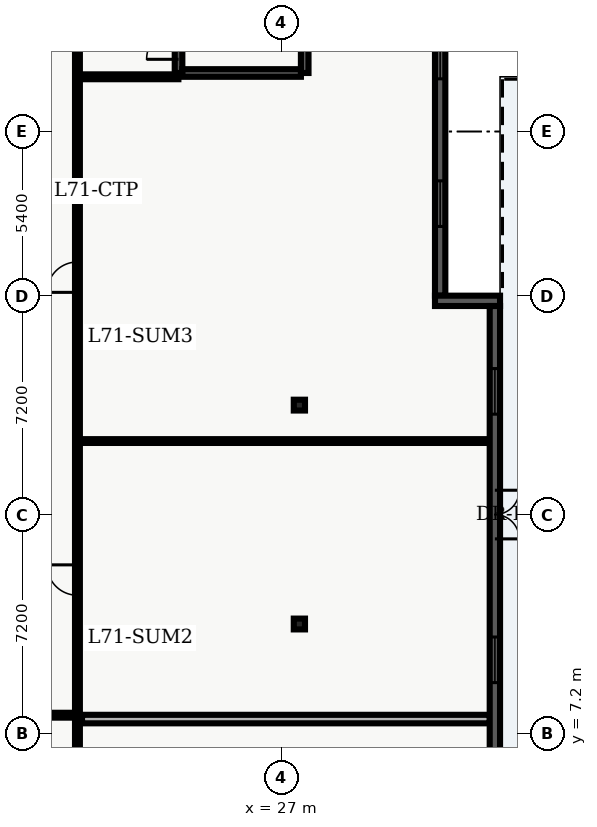
"""IFC4 building model, lengths in metres.
Left out: names, types, materials, properties, quantities, classifications, styles, units other than length and angle.
Written with IfcOpenShell. Run it as: python <this file> out.ifc"""

import sys

from ifc_helpers import new_model, entity, si_unit, converted_unit, direction, frame, origin_with_axes, origin_2d_with_axis, place, context, subcontext, project, spatial, polyline, rectangle, i_section, outline, extrude, element, fill, save


model = new_model("IFC4")
c1 = context("Model", 3, precision=1e-05, world=origin_with_axes(), true_north=direction((0.0, 1.0)))
c2 = subcontext(c1, "Body", "Model", "MODEL_VIEW")
j1 = project(units=[si_unit("LENGTHUNIT", "METRE"), converted_unit("PLANEANGLEUNIT", "DEGREE", entity("IfcPlaneAngleMeasure", 0.017), si_unit("PLANEANGLEUNIT", "RADIAN"), dimensions=[0, 0, 0, 0, 0, 0, 0])], contexts=[c1])
p1 = place(None, origin_with_axes())
s1 = spatial("IfcSite", under=j1, at=p1, CompositionType="ELEMENT")
p2 = place(p1, origin_with_axes())
s2 = spatial("IfcBuilding", under=s1, at=p2, CompositionType="ELEMENT")
p3 = place(p2, frame((0.0, 0.0, 288.0), z_axis=(0.0, 0.0, 1.0), x_axis=(1.0, 0.0, 0.0)))
s3 = spatial("IfcBuildingStorey", under=s2, at=p3, CompositionType="ELEMENT", Elevation=288.0)
p4 = place(p3, frame((23.625, 28.925, 0.0), z_axis=(0.0, 0.0, 1.0), x_axis=(0.0, 1.0, 0.0)))
e1 = element("IfcWall", 1, at=p4, inside=s3, PredefinedType="SHEAR", context=c2, shape_type="SweptSolid", body=[
    extrude(outline(polyline([(0.0, -0.125), (8.65, -0.125), (8.65, 0.125), (0.0, 0.125), (0.0, -0.125)])), origin_with_axes(), (0.0, 0.0, 1.0), 3.66),
])
p5 = place(p4, frame((0.975, 0.0, 0.0), z_axis=(0.0, 0.0, 1.0), x_axis=(1.0, 0.0, 0.0)))
e2 = element("IfcOpeningElement", 2, at=p5, cuts=e1, PredefinedType="OPENING", context=c2, shape_type="SweptSolid", body=[
    extrude(rectangle(XDim=1.05, YDim=0.27, at=origin_2d_with_axis()), origin_with_axes(), (0.0, 0.0, 1.0), 2.15),
])
p6 = place(p3, frame((27.775, 28.925, 0.0), z_axis=(0.0, 0.0, 1.0), x_axis=(0.0, 1.0, 0.0)))
e3 = element("IfcWall", 3, at=p6, inside=s3, PredefinedType="SHEAR", context=c2, shape_type="SweptSolid", body=[
    extrude(outline(polyline([(0.0, -0.125), (8.65, -0.125), (8.65, 0.125), (0.0, 0.125), (0.0, -0.125)])), origin_with_axes(), (0.0, 0.0, 1.0), 3.66),
])
p7 = place(p3, frame((23.75, 28.925, 0.0), z_axis=(0.0, 0.0, 1.0), x_axis=(1.0, 0.0, 0.0)))
e4 = element("IfcWall", 4, at=p7, inside=s3, PredefinedType="SHEAR", context=c2, shape_type="SweptSolid", body=[
    extrude(outline(polyline([(0.0, -0.125), (3.9, -0.125), (3.9, 0.125), (0.0, 0.125), (0.0, -0.125)])), origin_with_axes(), (0.0, 0.0, 1.0), 3.66),
])
for number, where, z_axis, x_axis in (
    (5, (27.6, 10.8, 0.0), (0.0, 0.0, 1.0), (1.0, 0.0, 0.0)),
    (6, (27.6, 18.0, 0.0), (0.0, 0.0, 1.0), (1.0, 0.0, 0.0)),
):
    element("IfcColumn", number, at=place(p3, frame(where, z_axis=z_axis, x_axis=x_axis)), inside=s3, PredefinedType="COLUMN", context=c2, shape_type="SweptSolid", body=[
        extrude(i_section(OverallWidth=0.369, OverallDepth=0.356, WebThickness=0.011, FlangeThickness=0.018, FilletRadius=0.018, at=origin_2d_with_axis()), origin_with_axes(), (0.0, 0.0, 1.0), 3.9),
    ])
p8 = place(p3, frame((8.135, 7.8, 0.0), z_axis=(0.0, 0.0, 1.0), x_axis=(1.0, 0.0, 0.0)))
e7 = element("IfcWall", 7, at=p8, inside=s3, PredefinedType="PARTITIONING", context=c2, shape_type="SweptSolid", body=[
    extrude(outline(polyline([(0.0, -0.08), (12.165, -0.08), (12.165, 0.08), (0.0, 0.08), (0.0, -0.08)])), origin_with_axes(), (0.0, 0.0, 1.0), 2.7),
])
p9 = place(p8, frame((3.982, 0.0, 0.0), z_axis=(0.0, 0.0, 1.0), x_axis=(1.0, 0.0, 0.0)))
e8 = element("IfcOpeningElement", 8, at=p9, cuts=e7, PredefinedType="OPENING", context=c2, shape_type="SweptSolid", body=[
    extrude(rectangle(XDim=1.0, YDim=0.18, at=origin_2d_with_axis()), origin_with_axes(), (0.0, 0.0, 1.0), 2.15),
])
p10 = place(p8, frame((8.782, 0.0, 0.0), z_axis=(0.0, 0.0, 1.0), x_axis=(1.0, 0.0, 0.0)))
e9 = element("IfcOpeningElement", 9, at=p10, cuts=e7, PredefinedType="OPENING", context=c2, shape_type="SweptSolid", body=[
    extrude(rectangle(XDim=1.0, YDim=0.18, at=origin_2d_with_axis()), origin_with_axes(), (0.0, 0.0, 1.0), 2.15),
])
p11 = place(p3, frame((20.3, 0.335, 0.0), z_axis=(0.0, 0.0, 1.0), x_axis=(0.0, 1.0, 0.0)))
e10 = element("IfcWall", 10, at=p11, inside=s3, PredefinedType="PARTITIONING", context=c2, shape_type="SweptSolid", body=[
    extrude(outline(polyline([(0.0, -0.08), (40.165, -0.08), (40.165, 0.08), (0.0, 0.08), (0.0, -0.08)])), origin_with_axes(), (0.0, 0.0, 1.0), 2.7),
])
p12 = place(p11, frame((32.49, 0.0, 0.0), z_axis=(0.0, 0.0, 1.0), x_axis=(1.0, 0.0, 0.0)))
e11 = element("IfcOpeningElement", 11, at=p12, cuts=e10, PredefinedType="OPENING", context=c2, shape_type="SweptSolid", body=[
    extrude(rectangle(XDim=1.05, YDim=0.18, at=origin_2d_with_axis()), origin_with_axes(), (0.0, 0.0, 1.0), 2.15),
])
p13 = place(p11, frame((4.537, 0.0, 0.0), z_axis=(0.0, 0.0, 1.0), x_axis=(1.0, 0.0, 0.0)))
e12 = element("IfcOpeningElement", 12, at=p13, cuts=e10, PredefinedType="OPENING", context=c2, shape_type="SweptSolid", body=[
    extrude(rectangle(XDim=1.0, YDim=0.18, at=origin_2d_with_axis()), origin_with_axes(), (0.0, 0.0, 1.0), 2.15),
])
p14 = place(p11, frame((11.911, 0.0, 0.0), z_axis=(0.0, 0.0, 1.0), x_axis=(1.0, 0.0, 0.0)))
e13 = element("IfcOpeningElement", 13, at=p14, cuts=e10, PredefinedType="OPENING", context=c2, shape_type="SweptSolid", body=[
    extrude(rectangle(XDim=1.0, YDim=0.18, at=origin_2d_with_axis()), origin_with_axes(), (0.0, 0.0, 1.0), 2.15),
])
p15 = place(p11, frame((21.874, 0.0, 0.0), z_axis=(0.0, 0.0, 1.0), x_axis=(1.0, 0.0, 0.0)))
e14 = element("IfcOpeningElement", 14, at=p15, cuts=e10, PredefinedType="OPENING", context=c2, shape_type="SweptSolid", body=[
    extrude(rectangle(XDim=1.0, YDim=0.18, at=origin_2d_with_axis()), origin_with_axes(), (0.0, 0.0, 1.0), 2.15),
])
p16 = place(p3, frame((20.3, 28.8, 0.0), z_axis=(0.0, 0.0, 1.0), x_axis=(1.0, 0.0, 0.0)))
e15 = element("IfcWall", 15, at=p16, inside=s3, PredefinedType="PARTITIONING", context=c2, shape_type="SweptSolid", body=[
    extrude(outline(polyline([(0.0, -0.08), (3.32, -0.08), (3.32, 0.08), (0.0, 0.08), (0.0, -0.08)])), origin_with_axes(), (0.0, 0.0, 1.0), 2.7),
])
p17 = place(p3, frame((20.45, 7.673, 0.0), z_axis=(0.0, 0.0, 1.0), x_axis=(1.0, 0.0, 0.0)))
e16 = element("IfcWall", 16, at=p17, inside=s3, PredefinedType="PARTITIONING", context=c2, shape_type="SweptSolid", body=[
    extrude(outline(polyline([(0.0, -0.14), (13.415, -0.14), (13.415, 0.14), (0.0, 0.14), (0.0, -0.14)])), origin_with_axes(), (0.0, 0.0, 1.0), 2.7),
])
p18 = place(p3, frame((20.45, 16.818, 0.0), z_axis=(0.0, 0.0, 1.0), x_axis=(1.0, 0.0, 0.0)))
e17 = element("IfcWall", 17, at=p18, inside=s3, PredefinedType="PARTITIONING", context=c2, shape_type="SweptSolid", body=[
    extrude(outline(polyline([(0.0, -0.062), (13.415, -0.062), (13.415, 0.062), (0.0, 0.062), (0.0, -0.062)])), origin_with_axes(), (0.0, 0.0, 1.0), 2.7),
])
p19 = place(p3, frame((32.23, 42.22, 0.0), z_axis=(0.0, 0.0, 1.0), x_axis=(0.0, -1.0, 0.0)))
e18 = element("IfcWall", 18, at=p19, inside=s3, PredefinedType="SOLIDWALL", context=c2, shape_type="SweptSolid", body=[
    extrude(outline(polyline([(0.0, -0.17), (20.62, -0.17), (20.62, 0.17), (0.0, 0.17), (0.0, -0.17)])), origin_with_axes(), (0.0, 0.0, 1.0), 3.66),
])
p20 = place(p19, frame((3.027, 0.0, 0.45), z_axis=(0.0, 0.0, 1.0), x_axis=(1.0, 0.0, 0.0)))
e19 = element("IfcOpeningElement", 19, at=p20, cuts=e18, PredefinedType="OPENING", context=c2, shape_type="SweptSolid", body=[
    extrude(rectangle(XDim=1.5, YDim=0.36, at=origin_2d_with_axis()), origin_with_axes(), (0.0, 0.0, 1.0), 2.1),
])
p21 = place(p19, frame((7.882, 0.0, 0.45), z_axis=(0.0, 0.0, 1.0), x_axis=(1.0, 0.0, 0.0)))
e20 = element("IfcOpeningElement", 20, at=p21, cuts=e18, PredefinedType="OPENING", context=c2, shape_type="SweptSolid", body=[
    extrude(rectangle(XDim=1.5, YDim=0.36, at=origin_2d_with_axis()), origin_with_axes(), (0.0, 0.0, 1.0), 2.1),
])
p22 = place(p19, frame((12.737, 0.0, 0.45), z_axis=(0.0, 0.0, 1.0), x_axis=(1.0, 0.0, 0.0)))
e21 = element("IfcOpeningElement", 21, at=p22, cuts=e18, PredefinedType="OPENING", context=c2, shape_type="SweptSolid", body=[
    extrude(rectangle(XDim=1.5, YDim=0.36, at=origin_2d_with_axis()), origin_with_axes(), (0.0, 0.0, 1.0), 2.1),
])
p23 = place(p19, frame((17.593, 0.0, 0.45), z_axis=(0.0, 0.0, 1.0), x_axis=(1.0, 0.0, 0.0)))
e22 = element("IfcOpeningElement", 22, at=p23, cuts=e18, PredefinedType="OPENING", context=c2, shape_type="SweptSolid", body=[
    extrude(rectangle(XDim=1.5, YDim=0.36, at=origin_2d_with_axis()), origin_with_axes(), (0.0, 0.0, 1.0), 2.1),
])
p24 = place(p3, frame((32.06, 21.43, 0.0), z_axis=(0.0, 0.0, 1.0), x_axis=(1.0, 0.0, 0.0)))
e23 = element("IfcWall", 23, at=p24, inside=s3, PredefinedType="SOLIDWALL", context=c2, shape_type="SweptSolid", body=[
    extrude(outline(polyline([(0.0, -0.17), (2.14, -0.17), (2.14, 0.17), (0.0, 0.17), (0.0, -0.17)])), origin_with_axes(), (0.0, 0.0, 1.0), 3.66),
])
p25 = place(p3, frame((34.03, 21.26, 0.0), z_axis=(0.0, 0.0, 1.0), x_axis=(0.0, -1.0, 0.0)))
e24 = element("IfcWall", 24, at=p25, inside=s3, PredefinedType="SOLIDWALL", context=c2, shape_type="SweptSolid", body=[
    extrude(outline(polyline([(0.0, -0.17), (18.86, -0.17), (18.86, 0.17), (0.0, 0.17), (0.0, -0.17)])), origin_with_axes(), (0.0, 0.0, 1.0), 3.66),
])
p26 = place(p25, frame((6.86, 0.0, 0.0), z_axis=(0.0, 0.0, 1.0), x_axis=(1.0, 0.0, 0.0)))
e25 = element("IfcOpeningElement", 25, at=p26, cuts=e24, PredefinedType="OPENING", context=c2, shape_type="SweptSolid", body=[
    extrude(rectangle(XDim=1.6, YDim=0.36, at=origin_2d_with_axis()), origin_with_axes(), (0.0, 0.0, 1.0), 2.2),
])
p27 = place(p25, frame((2.808, 0.0, 0.45), z_axis=(0.0, 0.0, 1.0), x_axis=(1.0, 0.0, 0.0)))
e26 = element("IfcOpeningElement", 26, at=p27, cuts=e24, PredefinedType="OPENING", context=c2, shape_type="SweptSolid", body=[
    extrude(rectangle(XDim=1.5, YDim=0.36, at=origin_2d_with_axis()), origin_with_axes(), (0.0, 0.0, 1.0), 2.1),
])
p28 = place(p25, frame((11.638, 0.0, 0.45), z_axis=(0.0, 0.0, 1.0), x_axis=(1.0, 0.0, 0.0)))
e27 = element("IfcOpeningElement", 27, at=p28, cuts=e24, PredefinedType="OPENING", context=c2, shape_type="SweptSolid", body=[
    extrude(rectangle(XDim=1.5, YDim=0.36, at=origin_2d_with_axis()), origin_with_axes(), (0.0, 0.0, 1.0), 2.1),
])
p29 = place(p25, frame((16.053, 0.0, 0.45), z_axis=(0.0, 0.0, 1.0), x_axis=(1.0, 0.0, 0.0)))
e28 = element("IfcOpeningElement", 28, at=p29, cuts=e24, PredefinedType="OPENING", context=c2, shape_type="SweptSolid", body=[
    extrude(rectangle(XDim=1.5, YDim=0.36, at=origin_2d_with_axis()), origin_with_axes(), (0.0, 0.0, 1.0), 2.1),
])
p30 = place(p4, frame((0.975, 0.0, 0.0), z_axis=(0.0, 0.0, 1.0), x_axis=(1.0, 0.0, 0.0)))
e29 = element("IfcDoor", 29, at=p30, inside=s3, OperationType="SINGLE_SWING_LEFT", PredefinedType="DOOR", context=c2, shape_type="SweptSolid", body=[
    extrude(rectangle(XDim=1.05, YDim=0.09, at=origin_2d_with_axis()), origin_with_axes(), (0.0, 0.0, 1.0), 2.15),
])
fill(e2, e29)
p31 = place(p11, frame((11.911, 0.0, 0.0), z_axis=(0.0, 0.0, 1.0), x_axis=(1.0, 0.0, 0.0)))
e30 = element("IfcDoor", 30, at=p31, inside=s3, OperationType="SINGLE_SWING_RIGHT", PredefinedType="DOOR", context=c2, shape_type="SweptSolid", body=[
    extrude(rectangle(XDim=1.0, YDim=0.09, at=origin_2d_with_axis()), origin_with_axes(), (0.0, 0.0, 1.0), 2.15),
])
fill(e13, e30)
p32 = place(p11, frame((21.874, 0.0, 0.0), z_axis=(0.0, 0.0, 1.0), x_axis=(1.0, 0.0, 0.0)))
e31 = element("IfcDoor", 31, at=p32, inside=s3, OperationType="SINGLE_SWING_LEFT", PredefinedType="DOOR", context=c2, shape_type="SweptSolid", body=[
    extrude(rectangle(XDim=1.0, YDim=0.09, at=origin_2d_with_axis()), origin_with_axes(), (0.0, 0.0, 1.0), 2.15),
])
fill(e14, e31)
p33 = place(p25, frame((6.86, 0.0, 0.0), z_axis=(0.0, 0.0, 1.0), x_axis=(1.0, 0.0, 0.0)))
e32 = element("IfcDoor", 32, at=p33, inside=s3, OperationType="DOUBLE_DOOR_SINGLE_SWING", PredefinedType="DOOR", context=c2, shape_type="SweptSolid", body=[
    extrude(rectangle(XDim=1.6, YDim=0.09, at=origin_2d_with_axis()), origin_with_axes(), (0.0, 0.0, 1.0), 2.2),
])
fill(e25, e32)
p34 = place(p19, frame((12.737, 0.0, 0.45), z_axis=(0.0, 0.0, 1.0), x_axis=(1.0, 0.0, 0.0)))
e33 = element("IfcWindow", 33, at=p34, inside=s3, PredefinedType="WINDOW", context=c2, shape_type="SweptSolid", body=[
    extrude(rectangle(XDim=1.5, YDim=0.09, at=origin_2d_with_axis()), origin_with_axes(), (0.0, 0.0, 1.0), 2.1),
])
fill(e21, e33)
p35 = place(p19, frame((17.593, 0.0, 0.45), z_axis=(0.0, 0.0, 1.0), x_axis=(1.0, 0.0, 0.0)))
e34 = element("IfcWindow", 34, at=p35, inside=s3, PredefinedType="WINDOW", context=c2, shape_type="SweptSolid", body=[
    extrude(rectangle(XDim=1.5, YDim=0.09, at=origin_2d_with_axis()), origin_with_axes(), (0.0, 0.0, 1.0), 2.1),
])
fill(e22, e34)
p36 = place(p25, frame((2.808, 0.0, 0.45), z_axis=(0.0, 0.0, 1.0), x_axis=(1.0, 0.0, 0.0)))
e35 = element("IfcWindow", 35, at=p36, inside=s3, PredefinedType="WINDOW", context=c2, shape_type="SweptSolid", body=[
    extrude(rectangle(XDim=1.5, YDim=0.09, at=origin_2d_with_axis()), origin_with_axes(), (0.0, 0.0, 1.0), 2.1),
])
fill(e26, e35)
p37 = place(p25, frame((11.638, 0.0, 0.45), z_axis=(0.0, 0.0, 1.0), x_axis=(1.0, 0.0, 0.0)))
e36 = element("IfcWindow", 36, at=p37, inside=s3, PredefinedType="WINDOW", context=c2, shape_type="SweptSolid", body=[
    extrude(rectangle(XDim=1.5, YDim=0.09, at=origin_2d_with_axis()), origin_with_axes(), (0.0, 0.0, 1.0), 2.1),
])
fill(e27, e36)
save(model, sys.argv[1])
